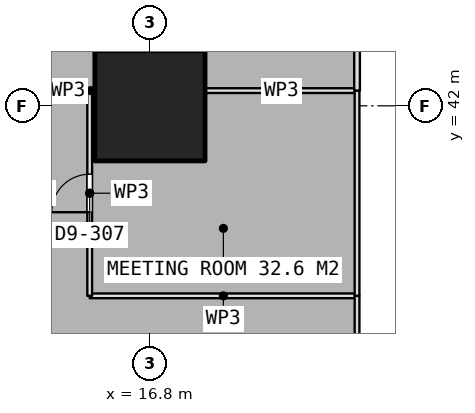
"""IFC4 building model, lengths in metres.
Left out: names, types, materials, properties, quantities, classifications, styles, units other than length and angle.
Written with IfcOpenShell. Run it as: python <this file> out.ifc"""

import sys

from ifc_helpers import new_model, si_unit, direction, frame, frame_2d, origin, origin_2d, place, context, subcontext, project, spatial, rectangle, extrude, element, fill, save


model = new_model("IFC4")
c1 = context("Model", 3, precision=1e-05, world=origin(), true_north=direction((0.0, 1.0)))
c2 = subcontext(c1, "Body", "Model", "MODEL_VIEW")
j1 = project(units=[si_unit("LENGTHUNIT", "METRE"), si_unit("PLANEANGLEUNIT", "RADIAN")], contexts=[c1])
p1 = place(None, origin())
s1 = spatial("IfcSite", under=j1, at=p1, CompositionType="ELEMENT")
p2 = place(p1, origin())
s2 = spatial("IfcBuilding", under=s1, at=p2, CompositionType="ELEMENT")
p3 = place(p2, frame((0.0, 0.0, 90.8)))
s3 = spatial("IfcBuildingStorey", under=s2, at=p3, CompositionType="ELEMENT", Elevation=90.8)
p4 = place(p3, frame((16.8, 42.0, 0.0), z_axis=(0.0, 0.0, 1.0), x_axis=(1.0, 0.0, 0.0)))
e1 = element("IfcColumn", 1, at=p4, inside=s3, PredefinedType="COLUMN", context=c2, shape_type="SweptSolid", body=[
    extrude(rectangle(XDim=2.9, YDim=2.9, at=origin_2d()), origin(), (0.0, 0.0, 1.0), 4.5),
])
p5 = place(p3, frame((15.215, 37.0, 0.0), z_axis=(0.0, 0.0, 1.0), x_axis=(1.0, 0.0, 0.0)))
e2 = element("IfcWall", 2, at=p5, inside=s3, PredefinedType="PARTITIONING", context=c2, shape_type="SweptSolid", body=[
    extrude(rectangle(XDim=7.035, YDim=0.125, at=frame_2d((3.518, 0.0))), origin(), (0.0, 0.0, 1.0), 4.25),
])
p6 = place(p3, frame((22.25, 37.0, 0.0), z_axis=(0.0, 0.0, 1.0), x_axis=(0.0, -1.0, 0.0)))
e3 = element("IfcWall", 3, at=p6, inside=s3, PredefinedType="PARTITIONING", context=c2, shape_type="SweptSolid", body=[
    extrude(rectangle(XDim=3.0, YDim=0.125, at=frame_2d((1.5, 0.0))), origin(), (0.0, 0.0, 1.0), 4.25),
])
p7 = place(p3, frame((15.215, 37.0, 0.0), z_axis=(0.0, 0.0, 1.0), x_axis=(0.0, 1.0, 0.0)))
e4 = element("IfcWall", 4, at=p7, inside=s3, PredefinedType="PARTITIONING", context=c2, shape_type="SweptSolid", body=[
    extrude(rectangle(XDim=5.4, YDim=0.125, at=frame_2d((2.7, 0.0))), origin(), (0.0, 0.0, 1.0), 4.25),
])
p8 = place(p7, frame((2.2, 0.0, 0.0)))
e5 = element("IfcOpeningElement", 5, at=p8, cuts=e4, PredefinedType="OPENING", context=c2, shape_type="SweptSolid", body=[
    extrude(rectangle(XDim=1.0, YDim=2.1, at=frame_2d((0.5, 1.05))), frame((0.0, 0.073, 0.0), z_axis=(0.0, -1.0, 0.0), x_axis=(1.0, 0.0, 0.0)), (0.0, 0.0, 1.0), 0.145),
])
p9 = place(p3, frame((18.27, 42.4, 0.0), z_axis=(0.0, 0.0, 1.0), x_axis=(1.0, 0.0, 0.0)))
e6 = element("IfcWall", 6, at=p9, inside=s3, PredefinedType="PARTITIONING", context=c2, shape_type="SweptSolid", body=[
    extrude(rectangle(XDim=3.98, YDim=0.125, at=frame_2d((1.99, 0.0))), origin(), (0.0, 0.0, 1.0), 4.25),
])
p10 = place(p3, frame((22.25, 42.4, 0.0), z_axis=(0.0, 0.0, 1.0), x_axis=(0.0, -1.0, 0.0)))
e7 = element("IfcWall", 7, at=p10, inside=s3, PredefinedType="PARTITIONING", context=c2, shape_type="SweptSolid", body=[
    extrude(rectangle(XDim=5.4, YDim=0.125, at=frame_2d((2.7, 0.0))), origin(), (0.0, 0.0, 1.0), 4.25),
])
p11 = place(p3, frame((22.25, 53.35, 0.0), z_axis=(0.0, 0.0, 1.0), x_axis=(0.0, -1.0, 0.0)))
e8 = element("IfcWall", 8, at=p11, inside=s3, PredefinedType="PARTITIONING", context=c2, shape_type="SweptSolid", body=[
    extrude(rectangle(XDim=10.95, YDim=0.15, at=frame_2d((5.475, 0.0))), origin(), (0.0, 0.0, 1.0), 4.25),
])
p12 = place(p3, frame((15.152, 42.4, 0.0), z_axis=(0.0, 0.0, 1.0), x_axis=(1.0, 0.0, 0.0)))
e9 = element("IfcWall", 9, at=p12, inside=s3, PredefinedType="PARTITIONING", context=c2, shape_type="SweptSolid", body=[
    extrude(rectangle(XDim=0.178, YDim=0.125, at=frame_2d((0.089, 0.0))), origin(), (0.0, 0.0, 1.0), 4.25),
])
p13 = place(p8, origin())
e10 = element("IfcDoor", 10, at=p13, inside=s3, OperationType="SINGLE_SWING_LEFT", PredefinedType="DOOR", context=c2, shape_type="SweptSolid", body=[
    extrude(rectangle(XDim=1.0, YDim=2.1, at=frame_2d((0.5, 1.05))), frame((0.0, 0.025, 0.0), z_axis=(0.0, -1.0, 0.0), x_axis=(1.0, 0.0, 0.0)), (0.0, 0.0, 1.0), 0.05),
])
fill(e5, e10)
save(model, sys.argv[1])
